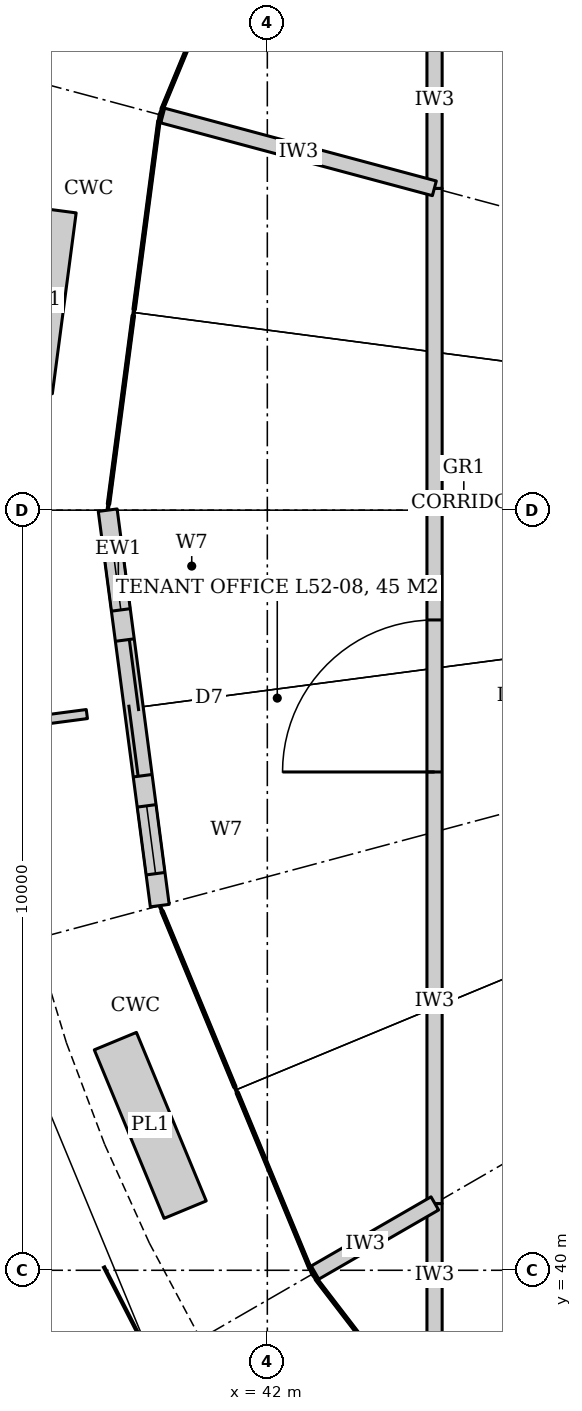
"""IFC4 building model, lengths in metres.
Left out: names, types, materials, properties, quantities, classifications, styles, units other than length and angle.
Written with IfcOpenShell. Run it as: python <this file> out.ifc"""

import sys

from ifc_helpers import new_model, si_unit, direction, frame, frame_2d, origin, place, context, subcontext, project, spatial, rectangle, extrude, element, fill, save


model = new_model("IFC4")
c1 = context("Model", 3, precision=1e-05, world=origin(), true_north=direction((0.0, 1.0)))
c2 = subcontext(c1, "Body", "Model", "MODEL_VIEW")
j1 = project(units=[si_unit("LENGTHUNIT", "METRE"), si_unit("PLANEANGLEUNIT", "RADIAN")], contexts=[c1])
p1 = place(None, origin())
s1 = spatial("IfcSite", under=j1, at=p1, CompositionType="ELEMENT")
p2 = place(p1, origin())
s2 = spatial("IfcBuilding", under=s1, at=p2, CompositionType="ELEMENT")
p3 = place(p2, frame((0.0, 0.0, 227.6)))
s3 = spatial("IfcBuildingStorey", under=s2, at=p3, CompositionType="ELEMENT", Elevation=227.6)
p4 = place(p3, frame((44.2, 39.0, 0.0), z_axis=(0.0, 0.0, 1.0), x_axis=(0.0, 1.0, 0.0)))
e1 = element("IfcWall", 1, at=p4, inside=s3, PredefinedType="PARTITIONING", context=c2, shape_type="SweptSolid", body=[
    extrude(rectangle(XDim=1.878, YDim=0.2, at=frame_2d((0.939, 0.0))), origin(), (0.0, 0.0, 1.0), 3.02),
])
p5 = place(p3, frame((44.2, 40.878, 0.0), z_axis=(0.0, 0.0, 1.0), x_axis=(0.0, 1.0, 0.0)))
e2 = element("IfcWall", 2, at=p5, inside=s3, PredefinedType="PARTITIONING", context=c2, shape_type="SweptSolid", body=[
    extrude(rectangle(XDim=13.356, YDim=0.2, at=frame_2d((6.678, 0.0))), origin(), (0.0, 0.0, 1.0), 3.02),
])
p6 = place(p5, frame((5.678, 0.0, 0.0)))
e3 = element("IfcOpeningElement", 3, at=p6, cuts=e2, PredefinedType="OPENING", context=c2, shape_type="SweptSolid", body=[
    extrude(rectangle(XDim=2.0, YDim=2.1, at=frame_2d((1.0, 1.05))), frame((0.0, 0.11, 0.0), z_axis=(0.0, -1.0, 0.0), x_axis=(1.0, 0.0, 0.0)), (0.0, 0.0, 1.0), 0.22),
])
p7 = place(p3, frame((44.2, 54.234, 0.0), z_axis=(0.0, 0.0, 1.0), x_axis=(0.0, 1.0, 0.0)))
e4 = element("IfcWall", 4, at=p7, inside=s3, PredefinedType="PARTITIONING", context=c2, shape_type="SweptSolid", body=[
    extrude(rectangle(XDim=4.566, YDim=0.2, at=frame_2d((2.283, 0.0))), origin(), (0.0, 0.0, 1.0), 3.02),
])
p8 = place(p7, frame((1.833, 0.0, 0.0)))
e5 = element("IfcOpeningElement", 5, at=p8, cuts=e4, PredefinedType="OPENING", context=c2, shape_type="SweptSolid", body=[
    extrude(rectangle(XDim=0.9, YDim=2.4, at=frame_2d((0.45, 1.2))), frame((0.0, 0.11, 0.0), z_axis=(0.0, -1.0, 0.0), x_axis=(1.0, 0.0, 0.0)), (0.0, 0.0, 1.0), 0.22),
])
p9 = place(p3, frame((44.198, 54.234, 0.0), z_axis=(0.0, 0.0, 1.0), x_axis=(-0.965934209463, 0.258787756644, 0.0)))
e6 = element("IfcWall", 6, at=p9, inside=s3, PredefinedType="PARTITIONING", context=c2, shape_type="SweptSolid", body=[
    extrude(rectangle(XDim=3.7, YDim=0.2, at=frame_2d((1.85, 0.0))), origin(), (0.0, 0.0, 1.0), 3.02),
])
p10 = place(p3, frame((44.204, 40.88, 0.0), z_axis=(0.0, 0.0, 1.0), x_axis=(-0.866047089031, -0.499962438169, 0.0)))
e7 = element("IfcWall", 7, at=p10, inside=s3, PredefinedType="PARTITIONING", context=c2, shape_type="SweptSolid", body=[
    extrude(rectangle(XDim=1.82, YDim=0.2, at=frame_2d((0.91, 0.0))), origin(), (0.0, 0.0, 1.0), 3.02),
])
p11 = place(p3, frame((39.9, 50.0, 0.0), z_axis=(0.0, 0.0, 1.0), x_axis=(0.130560429487, -0.991440353351, 0.0)))
e8 = element("IfcWall", 8, at=p11, inside=s3, PredefinedType="SOLIDWALL", context=c2, shape_type="SweptSolid", body=[
    extrude(rectangle(XDim=5.247, YDim=0.25, at=frame_2d((2.624, 0.0))), origin(), (0.0, 0.0, 1.0), 4.04),
])
p12 = place(p11, frame((1.724, 0.0, 0.0)))
e9 = element("IfcOpeningElement", 9, at=p12, cuts=e8, PredefinedType="OPENING", context=c2, shape_type="SweptSolid", body=[
    extrude(rectangle(XDim=1.8, YDim=2.4, at=frame_2d((0.9, 1.2))), frame((0.0, 0.135, 0.0), z_axis=(0.0, -1.0, 0.0), x_axis=(1.0, 0.0, 0.0)), (0.0, 0.0, 1.0), 0.27),
])
p13 = place(p11, frame((0.424, 0.0, 0.0)))
e10 = element("IfcOpeningElement", 10, at=p13, cuts=e8, PredefinedType="OPENING", context=c2, shape_type="SweptSolid", body=[
    extrude(rectangle(XDim=0.9, YDim=2.4, at=frame_2d((0.45, 1.2))), frame((0.0, 0.135, 0.0), z_axis=(0.0, -1.0, 0.0), x_axis=(1.0, 0.0, 0.0)), (0.0, 0.0, 1.0), 0.27),
])
p14 = place(p11, frame((3.924, 0.0, 0.0)))
e11 = element("IfcOpeningElement", 11, at=p14, cuts=e8, PredefinedType="OPENING", context=c2, shape_type="SweptSolid", body=[
    extrude(rectangle(XDim=0.9, YDim=2.4, at=frame_2d((0.45, 1.2))), frame((0.0, 0.135, 0.0), z_axis=(0.0, -1.0, 0.0), x_axis=(1.0, 0.0, 0.0)), (0.0, 0.0, 1.0), 0.27),
])
p15 = place(p6, origin())
e12 = element("IfcDoor", 12, at=p15, inside=s3, OperationType="DOUBLE_DOOR_DOUBLE_SWING", PredefinedType="DOOR", context=c2, shape_type="SweptSolid", body=[
    extrude(rectangle(XDim=2.0, YDim=2.1, at=frame_2d((1.0, 1.05))), frame((0.0, 0.025, 0.0), z_axis=(0.0, -1.0, 0.0), x_axis=(1.0, 0.0, 0.0)), (0.0, 0.0, 1.0), 0.05),
])
fill(e3, e12)
p16 = place(p12, origin())
e13 = element("IfcDoor", 13, at=p16, inside=s3, OperationType="DOUBLE_DOOR_SLIDING", PredefinedType="DOOR", context=c2, shape_type="SweptSolid", body=[
    extrude(rectangle(XDim=1.8, YDim=2.4, at=frame_2d((0.9, 1.2))), frame((0.0, 0.025, 0.0), z_axis=(0.0, -1.0, 0.0), x_axis=(1.0, 0.0, 0.0)), (0.0, 0.0, 1.0), 0.05),
])
fill(e9, e13)
p17 = place(p13, origin())
e14 = element("IfcWindow", 14, at=p17, inside=s3, PartitioningType="SINGLE_PANEL", PredefinedType="WINDOW", context=c2, shape_type="SweptSolid", body=[
    extrude(rectangle(XDim=0.9, YDim=2.4, at=frame_2d((0.45, 1.2))), frame((0.0, 0.03, 0.0), z_axis=(0.0, -1.0, 0.0), x_axis=(1.0, 0.0, 0.0)), (0.0, 0.0, 1.0), 0.06),
])
fill(e10, e14)
p18 = place(p14, origin())
e15 = element("IfcWindow", 15, at=p18, inside=s3, PartitioningType="SINGLE_PANEL", PredefinedType="WINDOW", context=c2, shape_type="SweptSolid", body=[
    extrude(rectangle(XDim=0.9, YDim=2.4, at=frame_2d((0.45, 1.2))), frame((0.0, 0.03, 0.0), z_axis=(0.0, -1.0, 0.0), x_axis=(1.0, 0.0, 0.0)), (0.0, 0.0, 1.0), 0.06),
])
fill(e11, e15)
save(model, sys.argv[1])
